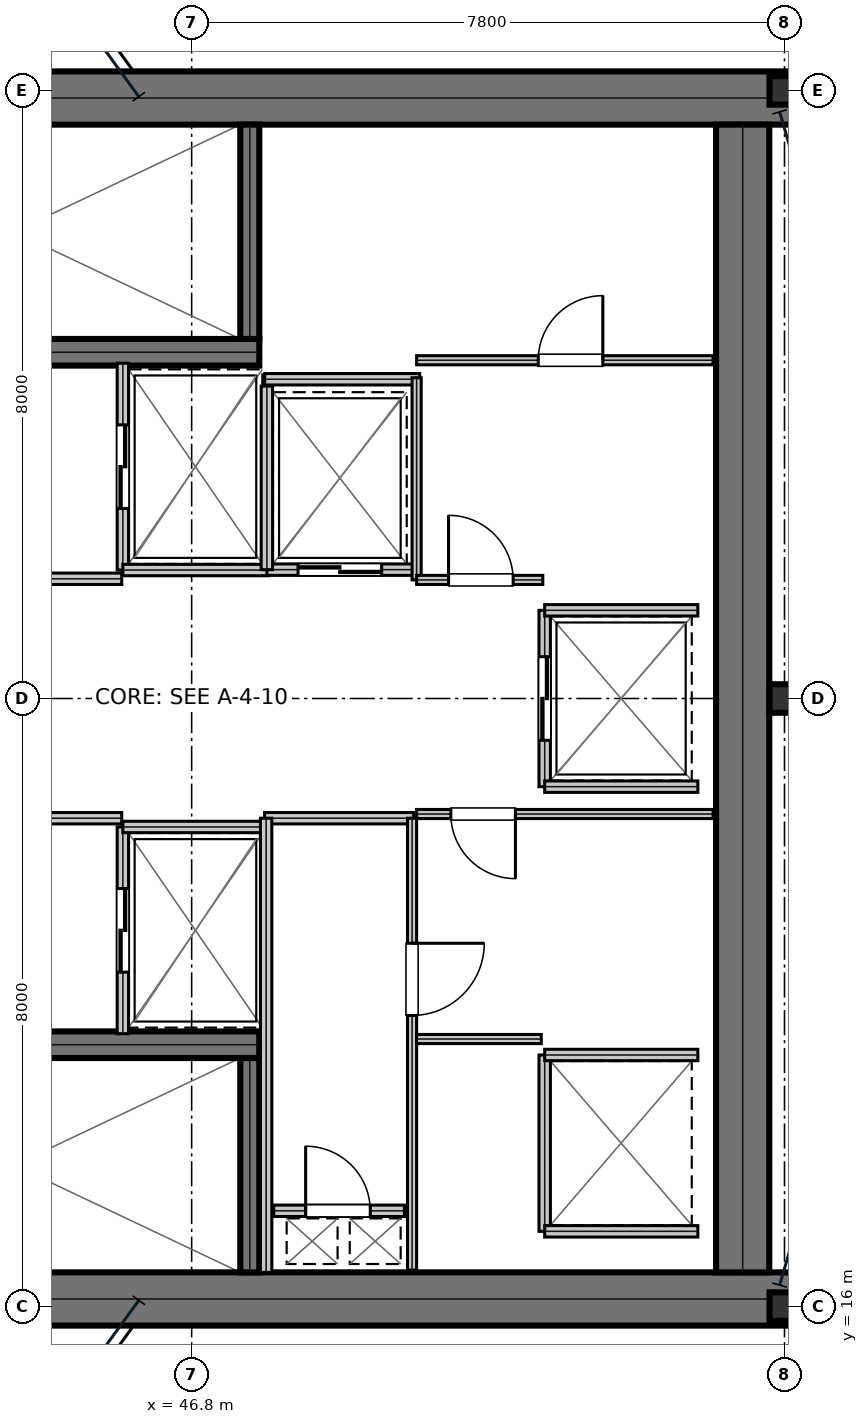
"""IFC4 building model, lengths in metres.
Left out: names, types, materials, properties, quantities, classifications, styles, units other than length and angle.
Written with IfcOpenShell. Run it as: python <this file> out.ifc"""

import sys

from ifc_helpers import new_model, si_unit, direction, frame, frame_2d, origin, origin_2d, place, context, subcontext, project, spatial, rectangle, i_section, extrude, element, fill, save


model = new_model("IFC4")
c1 = context("Model", 3, precision=1e-05, world=origin(), true_north=direction((0.0, 1.0)))
c2 = subcontext(c1, "Body", "Model", "MODEL_VIEW")
j1 = project(units=[si_unit("LENGTHUNIT", "METRE"), si_unit("PLANEANGLEUNIT", "RADIAN")], contexts=[c1])
p1 = place(None, origin())
s1 = spatial("IfcSite", under=j1, at=p1, CompositionType="ELEMENT")
p2 = place(p1, origin())
s2 = spatial("IfcBuilding", under=s1, at=p2, CompositionType="ELEMENT")
p3 = place(p2, frame((0.0, 0.0, 232.35)))
s3 = spatial("IfcBuildingStorey", under=s2, at=p3, CompositionType="ELEMENT", Elevation=232.35)
for number, where, z_axis, x_axis in (
    (1, (38.8, 31.9, 0.0), (0.0, 0.0, 1.0), (1.0, 0.0, 0.0)),
    (2, (38.8, 16.1, 0.0), (0.0, 0.0, 1.0), (1.0, 0.0, 0.0)),
):
    element("IfcWall", number, at=place(p3, frame(where, z_axis=z_axis, x_axis=x_axis)), inside=s3, PredefinedType="SHEAR", context=c2, shape_type="SweptSolid", body=[
        extrude(rectangle(XDim=16.0, YDim=0.7, at=frame_2d((8.0, 0.0))), origin(), (0.0, 0.0, 1.0), 3.79),
    ])
p4 = place(p3, frame((54.05, 16.45, 0.0), z_axis=(0.0, 0.0, 1.0), x_axis=(0.0, 1.0, 0.0)))
e3 = element("IfcWall", 3, at=p4, inside=s3, PredefinedType="SHEAR", context=c2, shape_type="SweptSolid", body=[
    extrude(rectangle(XDim=15.1, YDim=0.7, at=frame_2d((7.55, 0.0))), origin(), (0.0, 0.0, 1.0), 3.79),
])
p5 = place(p3, frame((39.98, 28.555, 0.0), z_axis=(0.0, 0.0, 1.0), x_axis=(1.0, 0.0, 0.0)))
e4 = element("IfcWall", 4, at=p5, inside=s3, PredefinedType="SHEAR", context=c2, shape_type="SweptSolid", body=[
    extrude(rectangle(XDim=7.71, YDim=0.35, at=frame_2d((3.855, 0.0))), origin(), (0.0, 0.0, 1.0), 3.79),
])
p6 = place(p5, frame((0.25, 0.0, 0.0)))
e5 = element("IfcOpeningElement", 5, at=p6, cuts=e4, PredefinedType="OPENING", context=c2, shape_type="SweptSolid", body=[
    extrude(rectangle(XDim=1.1, YDim=2.15, at=frame_2d((0.55, 1.075))), frame((0.0, 0.185, 0.0), z_axis=(0.0, -1.0, 0.0), x_axis=(1.0, 0.0, 0.0)), (0.0, 0.0, 1.0), 0.37),
])
p7 = place(p3, frame((39.98, 19.445, 0.0), z_axis=(0.0, 0.0, 1.0), x_axis=(1.0, 0.0, 0.0)))
e6 = element("IfcWall", 6, at=p7, inside=s3, PredefinedType="SHEAR", context=c2, shape_type="SweptSolid", body=[
    extrude(rectangle(XDim=7.71, YDim=0.35, at=frame_2d((3.855, 0.0))), origin(), (0.0, 0.0, 1.0), 3.79),
])
p8 = place(p7, frame((0.25, 0.0, 0.0)))
e7 = element("IfcOpeningElement", 7, at=p8, cuts=e6, PredefinedType="OPENING", context=c2, shape_type="SweptSolid", body=[
    extrude(rectangle(XDim=1.1, YDim=2.15, at=frame_2d((0.55, 1.075))), frame((0.0, 0.185, 0.0), z_axis=(0.0, -1.0, 0.0), x_axis=(1.0, 0.0, 0.0)), (0.0, 0.0, 1.0), 0.37),
])
for number, where, z_axis, x_axis in (
    (8, (47.565, 28.73, 0.0), (0.0, 0.0, 1.0), (0.0, 1.0, 0.0)),
    (9, (47.565, 16.45, 0.0), (0.0, 0.0, 1.0), (0.0, 1.0, 0.0)),
):
    element("IfcWall", number, at=place(p3, frame(where, z_axis=z_axis, x_axis=x_axis)), inside=s3, PredefinedType="SHEAR", context=c2, shape_type="SweptSolid", body=[
        extrude(rectangle(XDim=2.82, YDim=0.25, at=frame_2d((1.41, 0.0))), origin(), (0.0, 0.0, 1.0), 3.79),
    ])
for number, where, z_axis, x_axis in (
    (10, (54.6, 16.0, 0.0), (0.0, 0.0, 1.0), (1.0, 0.0, 0.0)),
    (11, (54.6, 24.0, 0.0), (0.0, 0.0, 1.0), (1.0, 0.0, 0.0)),
    (12, (54.6, 32.0, 0.0), (0.0, 0.0, 1.0), (1.0, 0.0, 0.0)),
):
    element("IfcColumn", number, at=place(p3, frame(where, z_axis=z_axis, x_axis=x_axis)), inside=s3, PredefinedType="COLUMN", context=c2, shape_type="SweptSolid", body=[
        extrude(i_section(OverallWidth=0.394, OverallDepth=0.375, WebThickness=0.017, FlangeThickness=0.028, at=origin_2d()), origin(), (0.0, 0.0, 1.0), 4.044),
    ])
p9 = place(p3, frame((39.98, 25.575, 0.0), z_axis=(0.0, 0.0, 1.0), x_axis=(1.0, 0.0, 0.0)))
e13 = element("IfcWall", 13, at=p9, inside=s3, PredefinedType="PARTITIONING", context=c2, shape_type="SweptSolid", body=[
    extrude(rectangle(XDim=5.9, YDim=0.15, at=frame_2d((2.95, 0.0))), origin(), (0.0, 0.0, 1.0), 3.79),
])
p10 = place(p9, frame((2.35, 0.0, 0.0)))
e14 = element("IfcOpeningElement", 14, at=p10, cuts=e13, PredefinedType="OPENING", context=c2, shape_type="SweptSolid", body=[
    extrude(rectangle(XDim=1.05, YDim=2.15, at=frame_2d((0.525, 1.075))), frame((0.0, 0.085, 0.0), z_axis=(0.0, -1.0, 0.0), x_axis=(1.0, 0.0, 0.0)), (0.0, 0.0, 1.0), 0.17),
])
p11 = place(p3, frame((39.98, 22.425, 0.0), z_axis=(0.0, 0.0, 1.0), x_axis=(1.0, 0.0, 0.0)))
e15 = element("IfcWall", 15, at=p11, inside=s3, PredefinedType="PARTITIONING", context=c2, shape_type="SweptSolid", body=[
    extrude(rectangle(XDim=5.9, YDim=0.15, at=frame_2d((2.95, 0.0))), origin(), (0.0, 0.0, 1.0), 3.79),
])
p12 = place(p11, frame((2.35, 0.0, 0.0)))
e16 = element("IfcOpeningElement", 16, at=p12, cuts=e15, PredefinedType="OPENING", context=c2, shape_type="SweptSolid", body=[
    extrude(rectangle(XDim=1.05, YDim=2.15, at=frame_2d((0.525, 1.075))), frame((0.0, 0.085, 0.0), z_axis=(0.0, -1.0, 0.0), x_axis=(1.0, 0.0, 0.0)), (0.0, 0.0, 1.0), 0.17),
])
p13 = place(p3, frame((45.895, 25.69, 0.0), z_axis=(0.0, 0.0, 1.0), x_axis=(0.0, 1.0, 0.0)))
e17 = element("IfcWall", 17, at=p13, inside=s3, PredefinedType="PARTITIONING", context=c2, shape_type="SweptSolid", body=[
    extrude(rectangle(XDim=2.72, YDim=0.15, at=frame_2d((1.36, 0.0))), origin(), (0.0, 0.0, 1.0), 3.79),
])
p14 = place(p13, frame((0.81, 0.0, 0.0)))
e18 = element("IfcOpeningElement", 18, at=p14, cuts=e17, PredefinedType="OPENING", context=c2, shape_type="SweptSolid", body=[
    extrude(rectangle(XDim=1.1, YDim=2.15, at=frame_2d((0.55, 1.075))), frame((0.0, 0.085, 0.0), z_axis=(0.0, -1.0, 0.0), x_axis=(1.0, 0.0, 0.0)), (0.0, 0.0, 1.0), 0.17),
])
p15 = place(p3, frame((45.895, 25.69, 0.0), z_axis=(0.0, 0.0, 1.0), x_axis=(1.0, 0.0, 0.0)))
e19 = element("IfcWall", 19, at=p15, inside=s3, PredefinedType="PARTITIONING", context=c2, shape_type="SweptSolid", body=[
    extrude(rectangle(XDim=1.915, YDim=0.15, at=frame_2d((0.958, 0.0))), origin(), (0.0, 0.0, 1.0), 3.79),
])
p16 = place(p3, frame((45.895, 19.59, 0.0), z_axis=(0.0, 0.0, 1.0), x_axis=(0.0, 1.0, 0.0)))
e20 = element("IfcWall", 20, at=p16, inside=s3, PredefinedType="PARTITIONING", context=c2, shape_type="SweptSolid", body=[
    extrude(rectangle(XDim=2.72, YDim=0.15, at=frame_2d((1.36, 0.0))), origin(), (0.0, 0.0, 1.0), 3.79),
])
p17 = place(p16, frame((0.81, 0.0, 0.0)))
e21 = element("IfcOpeningElement", 21, at=p17, cuts=e20, PredefinedType="OPENING", context=c2, shape_type="SweptSolid", body=[
    extrude(rectangle(XDim=1.1, YDim=2.15, at=frame_2d((0.55, 1.075))), frame((0.0, 0.085, 0.0), z_axis=(0.0, -1.0, 0.0), x_axis=(1.0, 0.0, 0.0)), (0.0, 0.0, 1.0), 0.17),
])
p18 = place(p3, frame((45.895, 22.31, 0.0), z_axis=(0.0, 0.0, 1.0), x_axis=(1.0, 0.0, 0.0)))
e22 = element("IfcWall", 22, at=p18, inside=s3, PredefinedType="PARTITIONING", context=c2, shape_type="SweptSolid", body=[
    extrude(rectangle(XDim=1.915, YDim=0.15, at=frame_2d((0.958, 0.0))), origin(), (0.0, 0.0, 1.0), 3.79),
])
p19 = place(p3, frame((47.79, 25.695, 0.0), z_axis=(0.0, 0.0, 1.0), x_axis=(1.0, 0.0, 0.0)))
e23 = element("IfcWall", 23, at=p19, inside=s3, PredefinedType="PARTITIONING", context=c2, shape_type="SweptSolid", body=[
    extrude(rectangle(XDim=1.92, YDim=0.15, at=frame_2d((0.96, 0.0))), origin(), (0.0, 0.0, 1.0), 3.79),
])
p20 = place(p19, frame((0.41, 0.0, 0.0)))
e24 = element("IfcOpeningElement", 24, at=p20, cuts=e23, PredefinedType="OPENING", context=c2, shape_type="SweptSolid", body=[
    extrude(rectangle(XDim=1.1, YDim=2.15, at=frame_2d((0.55, 1.075))), frame((0.0, 0.085, 0.0), z_axis=(0.0, -1.0, 0.0), x_axis=(1.0, 0.0, 0.0)), (0.0, 0.0, 1.0), 0.17),
])
p21 = place(p3, frame((47.79, 25.695, 0.0), z_axis=(0.0, 0.0, 1.0), x_axis=(0.0, 1.0, 0.0)))
e25 = element("IfcWall", 25, at=p21, inside=s3, PredefinedType="PARTITIONING", context=c2, shape_type="SweptSolid", body=[
    extrude(rectangle(XDim=2.415, YDim=0.15, at=frame_2d((1.208, 0.0))), origin(), (0.0, 0.0, 1.0), 3.79),
])
p22 = place(p3, frame((51.445, 22.84, 0.0), z_axis=(0.0, 0.0, 1.0), x_axis=(0.0, 1.0, 0.0)))
e26 = element("IfcWall", 26, at=p22, inside=s3, PredefinedType="PARTITIONING", context=c2, shape_type="SweptSolid", body=[
    extrude(rectangle(XDim=2.32, YDim=0.15, at=frame_2d((1.16, 0.0))), origin(), (0.0, 0.0, 1.0), 3.79),
])
p23 = place(p22, frame((0.61, 0.0, 0.0)))
e27 = element("IfcOpeningElement", 27, at=p23, cuts=e26, PredefinedType="OPENING", context=c2, shape_type="SweptSolid", body=[
    extrude(rectangle(XDim=1.1, YDim=2.15, at=frame_2d((0.55, 1.075))), frame((0.0, 0.085, 0.0), z_axis=(0.0, -1.0, 0.0), x_axis=(1.0, 0.0, 0.0)), (0.0, 0.0, 1.0), 0.17),
])
for number, where, z_axis, x_axis in (
    (28, (51.445, 22.84, 0.0), (0.0, 0.0, 1.0), (1.0, 0.0, 0.0)),
    (29, (51.445, 25.16, 0.0), (0.0, 0.0, 1.0), (1.0, 0.0, 0.0)),
):
    element("IfcWall", number, at=place(p3, frame(where, z_axis=z_axis, x_axis=x_axis)), inside=s3, PredefinedType="PARTITIONING", context=c2, shape_type="SweptSolid", body=[
        extrude(rectangle(XDim=2.015, YDim=0.15, at=frame_2d((1.007, 0.0))), origin(), (0.0, 0.0, 1.0), 3.79),
    ])
p24 = place(p3, frame((51.445, 16.99, 0.0), z_axis=(0.0, 0.0, 1.0), x_axis=(0.0, 1.0, 0.0)))
e30 = element("IfcWall", 30, at=p24, inside=s3, PredefinedType="PARTITIONING", context=c2, shape_type="SweptSolid", body=[
    extrude(rectangle(XDim=2.32, YDim=0.15, at=frame_2d((1.16, 0.0))), origin(), (0.0, 0.0, 1.0), 3.79),
])
for number, where, z_axis, x_axis in (
    (31, (51.445, 16.99, 0.0), (0.0, 0.0, 1.0), (1.0, 0.0, 0.0)),
    (32, (51.445, 19.31, 0.0), (0.0, 0.0, 1.0), (1.0, 0.0, 0.0)),
):
    element("IfcWall", number, at=place(p3, frame(where, z_axis=z_axis, x_axis=x_axis)), inside=s3, PredefinedType="PARTITIONING", context=c2, shape_type="SweptSolid", body=[
        extrude(rectangle(XDim=2.015, YDim=0.15, at=frame_2d((1.007, 0.0))), origin(), (0.0, 0.0, 1.0), 3.79),
    ])
p25 = place(p3, frame((47.88, 17.26, 0.0), z_axis=(0.0, 0.0, 1.0), x_axis=(1.0, 0.0, 0.0)))
e33 = element("IfcWall", 33, at=p25, inside=s3, PredefinedType="PARTITIONING", context=c2, shape_type="SweptSolid", body=[
    extrude(rectangle(XDim=1.72, YDim=0.15, at=frame_2d((0.86, 0.0))), origin(), (0.0, 0.0, 1.0), 3.79),
])
p26 = place(p25, frame((0.42, 0.0, 0.0)))
e34 = element("IfcOpeningElement", 34, at=p26, cuts=e33, PredefinedType="OPENING", context=c2, shape_type="SweptSolid", body=[
    extrude(rectangle(XDim=0.85, YDim=2.15, at=frame_2d((0.425, 1.075))), frame((0.0, 0.085, 0.0), z_axis=(0.0, -1.0, 0.0), x_axis=(1.0, 0.0, 0.0)), (0.0, 0.0, 1.0), 0.17),
])
p27 = place(p3, frame((47.76, 22.425, 0.0), z_axis=(0.0, 0.0, 1.0), x_axis=(1.0, 0.0, 0.0)))
e35 = element("IfcWall", 35, at=p27, inside=s3, PredefinedType="PARTITIONING", context=c2, shape_type="SweptSolid", body=[
    extrude(rectangle(XDim=1.96, YDim=0.15, at=frame_2d((0.98, 0.0))), origin(), (0.0, 0.0, 1.0), 3.79),
])
p28 = place(p3, frame((47.78, 16.45, 0.0), z_axis=(0.0, 0.0, 1.0), x_axis=(0.0, 1.0, 0.0)))
e36 = element("IfcWall", 36, at=p28, inside=s3, PredefinedType="PARTITIONING", context=c2, shape_type="SweptSolid", body=[
    extrude(rectangle(XDim=5.975, YDim=0.15, at=frame_2d((2.988, 0.0))), origin(), (0.0, 0.0, 1.0), 3.79),
])
p29 = place(p3, frame((49.7, 16.48, 0.0), z_axis=(0.0, 0.0, 1.0), x_axis=(0.0, 1.0, 0.0)))
e37 = element("IfcWall", 37, at=p29, inside=s3, PredefinedType="PARTITIONING", context=c2, shape_type="SweptSolid", body=[
    extrude(rectangle(XDim=5.945, YDim=0.12, at=frame_2d((2.973, 0.0))), origin(), (0.0, 0.0, 1.0), 3.79),
])
p30 = place(p29, frame((3.35, 0.0, 0.0)))
e38 = element("IfcOpeningElement", 38, at=p30, cuts=e37, PredefinedType="OPENING", context=c2, shape_type="SweptSolid", body=[
    extrude(rectangle(XDim=0.95, YDim=2.15, at=frame_2d((0.475, 1.075))), frame((0.0, 0.07, 0.0), z_axis=(0.0, -1.0, 0.0), x_axis=(1.0, 0.0, 0.0)), (0.0, 0.0, 1.0), 0.14),
])
p31 = place(p3, frame((49.76, 22.48, 0.0), z_axis=(0.0, 0.0, 1.0), x_axis=(1.0, 0.0, 0.0)))
e39 = element("IfcWall", 39, at=p31, inside=s3, PredefinedType="PARTITIONING", context=c2, shape_type="SweptSolid", body=[
    extrude(rectangle(XDim=3.9, YDim=0.12, at=frame_2d((1.95, 0.0))), origin(), (0.0, 0.0, 1.0), 3.79),
])
p32 = place(p31, frame((0.45, 0.0, 0.0)))
e40 = element("IfcOpeningElement", 40, at=p32, cuts=e39, PredefinedType="OPENING", context=c2, shape_type="SweptSolid", body=[
    extrude(rectangle(XDim=0.85, YDim=2.15, at=frame_2d((0.425, 1.075))), frame((0.0, 0.07, 0.0), z_axis=(0.0, -1.0, 0.0), x_axis=(1.0, 0.0, 0.0)), (0.0, 0.0, 1.0), 0.14),
])
p33 = place(p3, frame((49.76, 19.52, 0.0), z_axis=(0.0, 0.0, 1.0), x_axis=(1.0, 0.0, 0.0)))
e41 = element("IfcWall", 41, at=p33, inside=s3, PredefinedType="PARTITIONING", context=c2, shape_type="SweptSolid", body=[
    extrude(rectangle(XDim=1.64, YDim=0.12, at=frame_2d((0.82, 0.0))), origin(), (0.0, 0.0, 1.0), 3.79),
])
p34 = place(p3, frame((47.76, 28.2, 0.0), z_axis=(0.0, 0.0, 1.0), x_axis=(1.0, 0.0, 0.0)))
e42 = element("IfcWall", 42, at=p34, inside=s3, PredefinedType="PARTITIONING", context=c2, shape_type="SweptSolid", body=[
    extrude(rectangle(XDim=2.04, YDim=0.15, at=frame_2d((1.02, 0.0))), origin(), (0.0, 0.0, 1.0), 3.79),
])
p35 = place(p3, frame((49.76, 25.56, 0.0), z_axis=(0.0, 0.0, 1.0), x_axis=(0.0, 1.0, 0.0)))
e43 = element("IfcWall", 43, at=p35, inside=s3, PredefinedType="PARTITIONING", context=c2, shape_type="SweptSolid", body=[
    extrude(rectangle(XDim=2.66, YDim=0.12, at=frame_2d((1.33, 0.0))), origin(), (0.0, 0.0, 1.0), 3.79),
])
p36 = place(p3, frame((49.76, 25.56, 0.0), z_axis=(0.0, 0.0, 1.0), x_axis=(1.0, 0.0, 0.0)))
e44 = element("IfcWall", 44, at=p36, inside=s3, PredefinedType="PARTITIONING", context=c2, shape_type="SweptSolid", body=[
    extrude(rectangle(XDim=1.66, YDim=0.12, at=frame_2d((0.83, 0.0))), origin(), (0.0, 0.0, 1.0), 3.79),
])
p37 = place(p36, frame((0.42, 0.0, 0.0)))
e45 = element("IfcOpeningElement", 45, at=p37, cuts=e44, PredefinedType="OPENING", context=c2, shape_type="SweptSolid", body=[
    extrude(rectangle(XDim=0.85, YDim=2.15, at=frame_2d((0.425, 1.075))), frame((0.0, 0.07, 0.0), z_axis=(0.0, -1.0, 0.0), x_axis=(1.0, 0.0, 0.0)), (0.0, 0.0, 1.0), 0.14),
])
p38 = place(p3, frame((49.76, 28.45, 0.0), z_axis=(0.0, 0.0, 1.0), x_axis=(1.0, 0.0, 0.0)))
e46 = element("IfcWall", 46, at=p38, inside=s3, PredefinedType="PARTITIONING", context=c2, shape_type="SweptSolid", body=[
    extrude(rectangle(XDim=3.9, YDim=0.12, at=frame_2d((1.95, 0.0))), origin(), (0.0, 0.0, 1.0), 3.79),
])
p39 = place(p38, frame((1.6, 0.0, 0.0)))
e47 = element("IfcOpeningElement", 47, at=p39, cuts=e46, PredefinedType="OPENING", context=c2, shape_type="SweptSolid", body=[
    extrude(rectangle(XDim=0.85, YDim=2.15, at=frame_2d((0.425, 1.075))), frame((0.0, 0.07, 0.0), z_axis=(0.0, -1.0, 0.0), x_axis=(1.0, 0.0, 0.0)), (0.0, 0.0, 1.0), 0.14),
])
p40 = place(p14, frame((1.1, 0.0, 0.0), z_axis=(0.0, 0.0, 1.0), x_axis=(-1.0, 0.0, 0.0)))
e48 = element("IfcDoor", 48, at=p40, inside=s3, OperationType="DOUBLE_DOOR_SLIDING", PredefinedType="DOOR", context=c2, shape_type="SweptSolid", body=[
    extrude(rectangle(XDim=1.1, YDim=2.15, at=frame_2d((0.55, 1.075))), frame((0.0, 0.025, 0.0), z_axis=(0.0, -1.0, 0.0), x_axis=(1.0, 0.0, 0.0)), (0.0, 0.0, 1.0), 0.05),
])
fill(e18, e48)
p41 = place(p17, frame((1.1, 0.0, 0.0), z_axis=(0.0, 0.0, 1.0), x_axis=(-1.0, 0.0, 0.0)))
e49 = element("IfcDoor", 49, at=p41, inside=s3, OperationType="DOUBLE_DOOR_SLIDING", PredefinedType="DOOR", context=c2, shape_type="SweptSolid", body=[
    extrude(rectangle(XDim=1.1, YDim=2.15, at=frame_2d((0.55, 1.075))), frame((0.0, 0.025, 0.0), z_axis=(0.0, -1.0, 0.0), x_axis=(1.0, 0.0, 0.0)), (0.0, 0.0, 1.0), 0.05),
])
fill(e21, e49)
p42 = place(p20, frame((1.1, 0.0, 0.0), z_axis=(0.0, 0.0, 1.0), x_axis=(-1.0, 0.0, 0.0)))
e50 = element("IfcDoor", 50, at=p42, inside=s3, OperationType="DOUBLE_DOOR_SLIDING", PredefinedType="DOOR", context=c2, shape_type="SweptSolid", body=[
    extrude(rectangle(XDim=1.1, YDim=2.15, at=frame_2d((0.55, 1.075))), frame((0.0, 0.025, 0.0), z_axis=(0.0, -1.0, 0.0), x_axis=(1.0, 0.0, 0.0)), (0.0, 0.0, 1.0), 0.05),
])
fill(e24, e50)
p43 = place(p23, frame((1.1, 0.0, 0.0), z_axis=(0.0, 0.0, 1.0), x_axis=(-1.0, 0.0, 0.0)))
e51 = element("IfcDoor", 51, at=p43, inside=s3, OperationType="DOUBLE_DOOR_SLIDING", PredefinedType="DOOR", context=c2, shape_type="SweptSolid", body=[
    extrude(rectangle(XDim=1.1, YDim=2.15, at=frame_2d((0.55, 1.075))), frame((0.0, 0.025, 0.0), z_axis=(0.0, -1.0, 0.0), x_axis=(1.0, 0.0, 0.0)), (0.0, 0.0, 1.0), 0.05),
])
fill(e27, e51)
p44 = place(p26, origin())
e52 = element("IfcDoor", 52, at=p44, inside=s3, OperationType="SINGLE_SWING_LEFT", PredefinedType="TRAPDOOR", context=c2, shape_type="SweptSolid", body=[
    extrude(rectangle(XDim=0.85, YDim=2.15, at=frame_2d((0.425, 1.075))), frame((0.0, 0.025, 0.0), z_axis=(0.0, -1.0, 0.0), x_axis=(1.0, 0.0, 0.0)), (0.0, 0.0, 1.0), 0.05),
])
fill(e34, e52)
p45 = place(p30, frame((0.95, 0.0, 0.0), z_axis=(0.0, 0.0, 1.0), x_axis=(-1.0, 0.0, 0.0)))
e53 = element("IfcDoor", 53, at=p45, inside=s3, OperationType="SINGLE_SWING_LEFT", PredefinedType="DOOR", context=c2, shape_type="SweptSolid", body=[
    extrude(rectangle(XDim=0.95, YDim=2.15, at=frame_2d((0.475, 1.075))), frame((0.0, 0.025, 0.0), z_axis=(0.0, -1.0, 0.0), x_axis=(1.0, 0.0, 0.0)), (0.0, 0.0, 1.0), 0.05),
])
fill(e38, e53)
p46 = place(p32, frame((0.85, 0.0, 0.0), z_axis=(0.0, 0.0, 1.0), x_axis=(-1.0, 0.0, 0.0)))
e54 = element("IfcDoor", 54, at=p46, inside=s3, OperationType="SINGLE_SWING_LEFT", PredefinedType="DOOR", context=c2, shape_type="SweptSolid", body=[
    extrude(rectangle(XDim=0.85, YDim=2.15, at=frame_2d((0.425, 1.075))), frame((0.0, 0.025, 0.0), z_axis=(0.0, -1.0, 0.0), x_axis=(1.0, 0.0, 0.0)), (0.0, 0.0, 1.0), 0.05),
])
fill(e40, e54)
p47 = place(p37, origin())
e55 = element("IfcDoor", 55, at=p47, inside=s3, OperationType="SINGLE_SWING_LEFT", PredefinedType="DOOR", context=c2, shape_type="SweptSolid", body=[
    extrude(rectangle(XDim=0.85, YDim=2.15, at=frame_2d((0.425, 1.075))), frame((0.0, 0.025, 0.0), z_axis=(0.0, -1.0, 0.0), x_axis=(1.0, 0.0, 0.0)), (0.0, 0.0, 1.0), 0.05),
])
fill(e45, e55)
p48 = place(p39, origin())
e56 = element("IfcDoor", 56, at=p48, inside=s3, OperationType="SINGLE_SWING_RIGHT", PredefinedType="DOOR", context=c2, shape_type="SweptSolid", body=[
    extrude(rectangle(XDim=0.85, YDim=2.15, at=frame_2d((0.425, 1.075))), frame((0.0, 0.025, 0.0), z_axis=(0.0, -1.0, 0.0), x_axis=(1.0, 0.0, 0.0)), (0.0, 0.0, 1.0), 0.05),
])
fill(e47, e56)
save(model, sys.argv[1])
